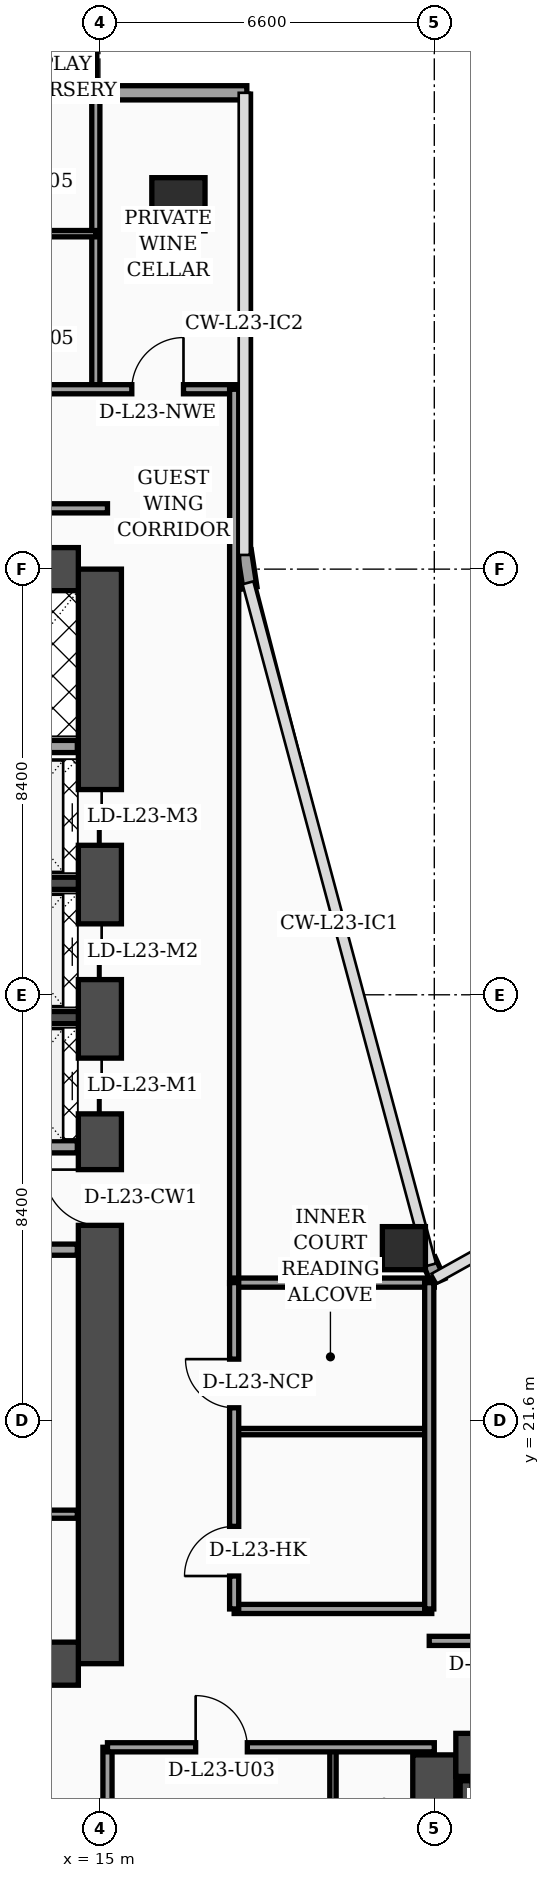
"""IFC4 building model, lengths in metres.
Left out: names, types, materials, properties, quantities, classifications, styles, units other than length and angle.
Written with IfcOpenShell. Run it as: python <this file> out.ifc"""

import sys

from ifc_helpers import new_model, si_unit, direction, frame, frame_2d, origin, origin_2d, place, context, subcontext, project, spatial, rectangle, hollow_rectangle, extrude, element, fill, save


model = new_model("IFC4")
c1 = context("Model", 3, precision=1e-05, world=origin(), true_north=direction((0.0, 1.0)))
c2 = subcontext(c1, "Body", "Model", "MODEL_VIEW")
j1 = project(units=[si_unit("LENGTHUNIT", "METRE"), si_unit("PLANEANGLEUNIT", "RADIAN")], contexts=[c1])
p1 = place(None, origin())
s1 = spatial("IfcSite", under=j1, at=p1, CompositionType="ELEMENT")
p2 = place(p1, origin())
s2 = spatial("IfcBuilding", under=s1, at=p2, CompositionType="ELEMENT")
p3 = place(p2, frame((0.0, 0.0, 97.4)))
s3 = spatial("IfcBuildingStorey", under=s2, at=p3, CompositionType="ELEMENT", Elevation=97.4)
p4 = place(p3, frame((15.0, 16.8, 0.0), z_axis=(0.0, 0.0, 1.0), x_axis=(0.0, 1.0, 0.0)))
e1 = element("IfcWall", 1, at=p4, inside=s3, PredefinedType="SHEAR", context=c2, shape_type="SweptSolid", body=[
    extrude(rectangle(XDim=21.6, YDim=0.85, at=frame_2d((10.8, 0.0))), origin(), (0.0, 0.0, 1.0), 3.56),
])
p5 = place(p4, frame((8.65, 0.0, 0.0)))
e2 = element("IfcOpeningElement", 2, at=p5, cuts=e1, PredefinedType="OPENING", context=c2, shape_type="SweptSolid", body=[
    extrude(rectangle(XDim=1.1, YDim=2.2, at=frame_2d((0.55, 1.1))), frame((0.0, 0.435, 0.0), z_axis=(0.0, -1.0, 0.0), x_axis=(1.0, 0.0, 0.0)), (0.0, 0.0, 1.0), 0.87),
])
p6 = place(p4, frame((10.85, 0.0, 0.0)))
e3 = element("IfcOpeningElement", 3, at=p6, cuts=e1, PredefinedType="OPENING", context=c2, shape_type="SweptSolid", body=[
    extrude(rectangle(XDim=1.1, YDim=2.2, at=frame_2d((0.55, 1.1))), frame((0.0, 0.435, 0.0), z_axis=(0.0, -1.0, 0.0), x_axis=(1.0, 0.0, 0.0)), (0.0, 0.0, 1.0), 0.87),
])
p7 = place(p4, frame((13.5, 0.0, 0.0)))
e4 = element("IfcOpeningElement", 4, at=p7, cuts=e1, PredefinedType="OPENING", context=c2, shape_type="SweptSolid", body=[
    extrude(rectangle(XDim=1.1, YDim=2.2, at=frame_2d((0.55, 1.1))), frame((0.0, 0.435, 0.0), z_axis=(0.0, -1.0, 0.0), x_axis=(1.0, 0.0, 0.0)), (0.0, 0.0, 1.0), 0.87),
])
p8 = place(p4, frame((16.15, 0.0, 0.0)))
e5 = element("IfcOpeningElement", 5, at=p8, cuts=e1, PredefinedType="OPENING", context=c2, shape_type="SweptSolid", body=[
    extrude(rectangle(XDim=1.1, YDim=2.2, at=frame_2d((0.55, 1.1))), frame((0.0, 0.435, 0.0), z_axis=(0.0, -1.0, 0.0), x_axis=(1.0, 0.0, 0.0)), (0.0, 0.0, 1.0), 0.87),
])
for number, where, z_axis, x_axis in (
    (6, (4.625, 38.4, 0.0), (0.0, 0.0, 1.0), (1.0, 0.0, 0.0)),
    (7, (4.625, 16.8, 0.0), (0.0, 0.0, 1.0), (1.0, 0.0, 0.0)),
):
    element("IfcWall", number, at=place(p3, frame(where, z_axis=z_axis, x_axis=x_axis)), inside=s3, PredefinedType="SHEAR", context=c2, shape_type="SweptSolid", body=[
        extrude(rectangle(XDim=9.95, YDim=0.85, at=frame_2d((4.975, 0.0))), origin(), (0.0, 0.0, 1.0), 3.56),
    ])
p9 = place(p3, frame((21.6, 4.6, 0.0), z_axis=(0.0, 0.0, 1.0), x_axis=(0.0, 1.0, 0.0)))
e8 = element("IfcWall", 8, at=p9, inside=s3, PredefinedType="SHEAR", context=c2, shape_type="SweptSolid", body=[
    extrude(rectangle(XDim=10.4, YDim=0.85, at=frame_2d((5.2, 0.0))), origin(), (0.0, 0.0, 1.0), 3.56),
])
p10 = place(p3, frame((22.025, 15.0, 0.0), z_axis=(0.0, 0.0, 1.0), x_axis=(1.0, 0.0, 0.0)))
e9 = element("IfcWall", 9, at=p10, inside=s3, PredefinedType="SHEAR", context=c2, shape_type="SweptSolid", body=[
    extrude(rectangle(XDim=9.95, YDim=0.85, at=frame_2d((4.975, 0.0))), origin(), (0.0, 0.0, 1.0), 3.56),
])
p11 = place(p10, frame((4.88, 0.0, 0.0)))
e10 = element("IfcOpeningElement", 10, at=p11, cuts=e9, PredefinedType="OPENING", context=c2, shape_type="SweptSolid", body=[
    extrude(rectangle(XDim=1.1, YDim=2.2, at=frame_2d((0.55, 1.1))), frame((0.0, 0.435, 0.0), z_axis=(0.0, -1.0, 0.0), x_axis=(1.0, 0.0, 0.0)), (0.0, 0.0, 1.0), 0.87),
])
p12 = place(p3, frame((22.23, 5.025, 0.0), z_axis=(0.0, 0.0, 1.0), x_axis=(0.0, 1.0, 0.0)))
e11 = element("IfcWall", 11, at=p12, inside=s3, PredefinedType="SOLIDWALL", context=c2, shape_type="SweptSolid", body=[
    extrude(rectangle(XDim=9.465, YDim=0.24, at=frame_2d((4.732, 0.0))), origin(), (0.0, 0.0, 1.0), 3.56),
])
for number, where, z_axis, x_axis in (
    (12, (12.18, 29.55, 0.0), (0.0, 0.0, 1.0), (1.0, 0.0, 0.0)),
    (13, (12.18, 32.2, 0.0), (0.0, 0.0, 1.0), (1.0, 0.0, 0.0)),
):
    element("IfcWall", number, at=place(p3, frame(where, z_axis=z_axis, x_axis=x_axis)), inside=s3, PredefinedType="SOLIDWALL", context=c2, shape_type="SweptSolid", body=[
        extrude(rectangle(XDim=2.395, YDim=0.24, at=frame_2d((1.198, 0.0))), origin(), (0.0, 0.0, 1.0), 3.56),
    ])
p13 = place(p3, frame((16.55, 45.6, 0.0), z_axis=(0.0, 0.0, 1.0), x_axis=(1.0, 0.0, 0.0)))
e14 = element("IfcColumn", 14, at=p13, inside=s3, PredefinedType="COLUMN", context=c2, shape_type="SweptSolid", body=[
    extrude(rectangle(XDim=1.05, YDim=1.05, at=origin_2d()), origin(), (0.0, 0.0, 1.0), 3.56),
])
p14 = place(p3, frame((21.0, 25.0, 0.0), z_axis=(0.0, 0.0, 1.0), x_axis=(1.0, 0.0, 0.0)))
e15 = element("IfcColumn", 15, at=p14, inside=s3, PredefinedType="COLUMN", context=c2, shape_type="SweptSolid", body=[
    extrude(hollow_rectangle(XDim=0.85, YDim=0.85, WallThickness=0.036, at=origin_2d()), origin(), (0.0, 0.0, 1.0), 3.56),
])
p15 = place(p3, frame((21.68, 24.34, 0.0), z_axis=(0.0, 0.0, 1.0), x_axis=(-0.40758134973, 0.913168901875, 0.0)))
e16 = element("IfcWall", 16, at=p15, inside=s3, PredefinedType="SOLIDWALL", context=c2, shape_type="SweptSolid", body=[
    extrude(rectangle(XDim=0.471, YDim=0.28, at=frame_2d((0.235, 0.0))), origin(), (0.0, 0.0, 1.0), 3.56),
])
p16 = place(p3, frame((17.962, 38.03, 0.0), z_axis=(0.0, 0.0, 1.0), x_axis=(-0.15141125477, 0.988470855377, 0.0)))
e17 = element("IfcWall", 17, at=p16, inside=s3, PredefinedType="SOLIDWALL", context=c2, shape_type="SweptSolid", body=[
    extrude(rectangle(XDim=0.739, YDim=0.28, at=frame_2d((0.369, 0.0))), origin(), (0.0, 0.0, 1.0), 3.56),
])
p17 = place(p3, frame((17.9, 47.8, 0.0), z_axis=(0.0, 0.0, 1.0), x_axis=(-1.0, 0.0, 0.0)))
e18 = element("IfcWall", 18, at=p17, inside=s3, PredefinedType="SOLIDWALL", context=c2, shape_type="SweptSolid", body=[
    extrude(rectangle(XDim=3.24, YDim=0.28, at=frame_2d((1.62, 0.0))), origin(), (0.0, 0.0, 1.0), 3.56),
])
p18 = place(p3, frame((14.8, 47.94, 0.0), z_axis=(0.0, 0.0, 1.0), x_axis=(0.0, 1.0, 0.0)))
e19 = element("IfcWall", 19, at=p18, inside=s3, PredefinedType="SOLIDWALL", context=c2, shape_type="SweptSolid", body=[
    extrude(rectangle(XDim=2.94, YDim=0.28, at=frame_2d((1.47, 0.0))), origin(), (0.0, 0.0, 1.0), 3.56),
])
p19 = place(p3, frame((9.68, 19.75, 0.0), z_axis=(0.0, 0.0, 1.0), x_axis=(1.0, 0.0, 0.0)))
e20 = element("IfcWall", 20, at=p19, inside=s3, PredefinedType="PARTITIONING", context=c2, shape_type="SweptSolid", body=[
    extrude(rectangle(XDim=4.875, YDim=0.16, at=frame_2d((2.438, 0.0))), origin(), (0.0, 0.0, 1.0), 3.56),
])
p20 = place(p19, frame((1.1, 0.0, 0.0)))
e21 = element("IfcOpeningElement", 21, at=p20, cuts=e20, PredefinedType="OPENING", context=c2, shape_type="SweptSolid", body=[
    extrude(rectangle(XDim=0.98, YDim=2.15, at=frame_2d((0.49, 1.075))), frame((0.0, 0.09, 0.0), z_axis=(0.0, -1.0, 0.0), x_axis=(1.0, 0.0, 0.0)), (0.0, 0.0, 1.0), 0.18),
])
p21 = place(p3, frame((9.68, 24.97, 0.0), z_axis=(0.0, 0.0, 1.0), x_axis=(1.0, 0.0, 0.0)))
e22 = element("IfcWall", 22, at=p21, inside=s3, PredefinedType="SOLIDWALL", context=c2, shape_type="SweptSolid", body=[
    extrude(rectangle(XDim=4.875, YDim=0.22, at=frame_2d((2.438, 0.0))), origin(), (0.0, 0.0, 1.0), 2.84),
])
p22 = place(p21, frame((0.9, 0.0, 0.0)))
e23 = element("IfcOpeningElement", 23, at=p22, cuts=e22, PredefinedType="OPENING", context=c2, shape_type="SweptSolid", body=[
    extrude(rectangle(XDim=0.98, YDim=2.15, at=frame_2d((0.49, 1.075))), frame((0.0, 0.12, 0.0), z_axis=(0.0, -1.0, 0.0), x_axis=(1.0, 0.0, 0.0)), (0.0, 0.0, 1.0), 0.24),
])
p23 = place(p3, frame((12.25, 27.0, 0.0), z_axis=(0.0, 0.0, 1.0), x_axis=(1.0, 0.0, 0.0)))
e24 = element("IfcWall", 24, at=p23, inside=s3, PredefinedType="SOLIDWALL", context=c2, shape_type="SweptSolid", body=[
    extrude(rectangle(XDim=2.305, YDim=0.24, at=frame_2d((1.152, 0.0))), origin(), (0.0, 0.0, 1.0), 3.56),
])
p24 = place(p3, frame((9.66, 34.9, 0.0), z_axis=(0.0, 0.0, 1.0), x_axis=(1.0, 0.0, 0.0)))
e25 = element("IfcWall", 25, at=p24, inside=s3, PredefinedType="SOLIDWALL", context=c2, shape_type="SweptSolid", body=[
    extrude(rectangle(XDim=4.895, YDim=0.24, at=frame_2d((2.448, 0.0))), origin(), (0.0, 0.0, 1.0), 3.56),
])
p25 = place(p3, frame((15.15, 2.44, 0.0), z_axis=(0.0, 0.0, 1.0), x_axis=(0.0, 1.0, 0.0)))
e26 = element("IfcWall", 26, at=p25, inside=s3, PredefinedType="PARTITIONING", context=c2, shape_type="SweptSolid", body=[
    extrude(rectangle(XDim=12.71, YDim=0.18, at=frame_2d((6.355, 0.0))), origin(), (0.0, 0.0, 1.0), 3.04),
])
p26 = place(p3, frame((19.6, 2.44, 0.0), z_axis=(0.0, 0.0, 1.0), x_axis=(0.0, 1.0, 0.0)))
e27 = element("IfcWall", 27, at=p26, inside=s3, PredefinedType="PARTITIONING", context=c2, shape_type="SweptSolid", body=[
    extrude(rectangle(XDim=12.71, YDim=0.125, at=frame_2d((6.355, 0.0))), origin(), (0.0, 0.0, 1.0), 2.49),
])
p27 = place(p26, frame((4.34, 0.0, 0.0)))
e28 = element("IfcOpeningElement", 28, at=p27, cuts=e27, PredefinedType="OPENING", context=c2, shape_type="SweptSolid", body=[
    extrude(rectangle(XDim=0.96, YDim=2.2, at=frame_2d((0.48, 1.1))), frame((0.0, 0.073, 0.0), z_axis=(0.0, -1.0, 0.0), x_axis=(1.0, 0.0, 0.0)), (0.0, 0.0, 1.0), 0.145),
])
p28 = place(p26, frame((10.18, 0.0, 0.0)))
e29 = element("IfcOpeningElement", 29, at=p28, cuts=e27, PredefinedType="OPENING", context=c2, shape_type="SweptSolid", body=[
    extrude(rectangle(XDim=0.9, YDim=2.15, at=frame_2d((0.45, 1.075))), frame((0.0, 0.073, 0.0), z_axis=(0.0, -1.0, 0.0), x_axis=(1.0, 0.0, 0.0)), (0.0, 0.0, 1.0), 0.145),
])
p29 = place(p3, frame((15.15, 15.15, 0.0), z_axis=(0.0, 0.0, 1.0), x_axis=(1.0, 0.0, 0.0)))
e30 = element("IfcWall", 30, at=p29, inside=s3, PredefinedType="PARTITIONING", context=c2, shape_type="SweptSolid", body=[
    extrude(rectangle(XDim=6.45, YDim=0.18, at=frame_2d((3.225, 0.0))), origin(), (0.0, 0.0, 1.0), 2.49),
])
p30 = place(p29, frame((1.74, 0.0, 0.0)))
e31 = element("IfcOpeningElement", 31, at=p30, cuts=e30, PredefinedType="OPENING", context=c2, shape_type="SweptSolid", body=[
    extrude(rectangle(XDim=1.02, YDim=2.2, at=frame_2d((0.51, 1.1))), frame((0.0, 0.1, 0.0), z_axis=(0.0, -1.0, 0.0), x_axis=(1.0, 0.0, 0.0)), (0.0, 0.0, 1.0), 0.2),
])
p31 = place(p3, frame((14.92, 41.95, 0.0), z_axis=(0.0, 0.0, 1.0), x_axis=(0.0, 1.0, 0.0)))
e32 = element("IfcWall", 32, at=p31, inside=s3, PredefinedType="PARTITIONING", context=c2, shape_type="SweptSolid", body=[
    extrude(rectangle(XDim=5.85, YDim=0.16, at=frame_2d((2.925, 0.0))), origin(), (0.0, 0.0, 1.0), 3.04),
])
p32 = place(p3, frame((12.99, 45.02, 0.0), z_axis=(0.0, 0.0, 1.0), x_axis=(1.0, 0.0, 0.0)))
e33 = element("IfcWall", 33, at=p32, inside=s3, PredefinedType="PARTITIONING", context=c2, shape_type="SweptSolid", body=[
    extrude(rectangle(XDim=1.93, YDim=0.125, at=frame_2d((0.965, 0.0))), origin(), (0.0, 0.0, 1.0), 3.56),
])
p33 = place(p3, frame((0.08, 41.95, 0.0), z_axis=(0.0, 0.0, 1.0), x_axis=(1.0, 0.0, 0.0)))
e34 = element("IfcWall", 34, at=p33, inside=s3, PredefinedType="PARTITIONING", context=c2, shape_type="SweptSolid", body=[
    extrude(rectangle(XDim=17.77, YDim=0.18, at=frame_2d((8.885, 0.0))), origin(), (0.0, 0.0, 1.0), 2.84),
])
p34 = place(p33, frame((0.9, 0.0, 0.0)))
e35 = element("IfcOpeningElement", 35, at=p34, cuts=e34, PredefinedType="OPENING", context=c2, shape_type="SweptSolid", body=[
    extrude(rectangle(XDim=1.02, YDim=2.2, at=frame_2d((0.51, 1.1))), frame((0.0, 0.1, 0.0), z_axis=(0.0, -1.0, 0.0), x_axis=(1.0, 0.0, 0.0)), (0.0, 0.0, 1.0), 0.2),
])
p35 = place(p33, frame((4.45, 0.0, 0.0)))
e36 = element("IfcOpeningElement", 36, at=p35, cuts=e34, PredefinedType="OPENING", context=c2, shape_type="SweptSolid", body=[
    extrude(rectangle(XDim=1.02, YDim=2.2, at=frame_2d((0.51, 1.1))), frame((0.0, 0.1, 0.0), z_axis=(0.0, -1.0, 0.0), x_axis=(1.0, 0.0, 0.0)), (0.0, 0.0, 1.0), 0.2),
])
p36 = place(p33, frame((10.33, 0.0, 0.0)))
e37 = element("IfcOpeningElement", 37, at=p36, cuts=e34, PredefinedType="OPENING", context=c2, shape_type="SweptSolid", body=[
    extrude(rectangle(XDim=1.02, YDim=2.2, at=frame_2d((0.51, 1.1))), frame((0.0, 0.1, 0.0), z_axis=(0.0, -1.0, 0.0), x_axis=(1.0, 0.0, 0.0)), (0.0, 0.0, 1.0), 0.2),
])
p37 = place(p33, frame((15.55, 0.0, 0.0)))
e38 = element("IfcOpeningElement", 38, at=p37, cuts=e34, PredefinedType="OPENING", context=c2, shape_type="SweptSolid", body=[
    extrude(rectangle(XDim=1.02, YDim=2.2, at=frame_2d((0.51, 1.1))), frame((0.0, 0.1, 0.0), z_axis=(0.0, -1.0, 0.0), x_axis=(1.0, 0.0, 0.0)), (0.0, 0.0, 1.0), 0.2),
])
p38 = place(p3, frame((17.65, 24.3, 0.0), z_axis=(0.0, 0.0, 1.0), x_axis=(0.0, 1.0, 0.0)))
e39 = element("IfcWall", 39, at=p38, inside=s3, PredefinedType="PARTITIONING", context=c2, shape_type="SweptSolid", body=[
    extrude(rectangle(XDim=17.65, YDim=0.18, at=frame_2d((8.825, 0.0))), origin(), (0.0, 0.0, 1.0), 2.84),
])
p39 = place(p3, frame((3.755, 39.6, 0.0), z_axis=(0.0, 0.0, 1.0), x_axis=(1.0, 0.0, 0.0)))
e40 = element("IfcWall", 40, at=p39, inside=s3, PredefinedType="PARTITIONING", context=c2, shape_type="SweptSolid", body=[
    extrude(rectangle(XDim=11.395, YDim=0.18, at=frame_2d((5.698, 0.0))), origin(), (0.0, 0.0, 1.0), 2.84),
])
p40 = place(p3, frame((17.65, 17.88, 0.0), z_axis=(0.0, 0.0, 1.0), x_axis=(1.0, 0.0, 0.0)))
e41 = element("IfcWall", 41, at=p40, inside=s3, PredefinedType="PARTITIONING", context=c2, shape_type="SweptSolid", body=[
    extrude(rectangle(XDim=3.9, YDim=0.18, at=frame_2d((1.95, 0.0))), origin(), (0.0, 0.0, 1.0), 3.56),
])
p41 = place(p3, frame((17.65, 21.38, 0.0), z_axis=(0.0, 0.0, 1.0), x_axis=(1.0, 0.0, 0.0)))
e42 = element("IfcWall", 42, at=p41, inside=s3, PredefinedType="PARTITIONING", context=c2, shape_type="SweptSolid", body=[
    extrude(rectangle(XDim=3.9, YDim=0.125, at=frame_2d((1.95, 0.0))), origin(), (0.0, 0.0, 1.0), 3.56),
])
p42 = place(p3, frame((17.65, 24.32, 0.0), z_axis=(0.0, 0.0, 1.0), x_axis=(1.0, 0.0, 0.0)))
e43 = element("IfcWall", 43, at=p42, inside=s3, PredefinedType="PARTITIONING", context=c2, shape_type="SweptSolid", body=[
    extrude(rectangle(XDim=3.95, YDim=0.18, at=frame_2d((1.975, 0.0))), origin(), (0.0, 0.0, 1.0), 3.56),
])
p43 = place(p3, frame((21.5, 17.88, 0.0), z_axis=(0.0, 0.0, 1.0), x_axis=(0.0, 1.0, 0.0)))
e44 = element("IfcWall", 44, at=p43, inside=s3, PredefinedType="PARTITIONING", context=c2, shape_type="SweptSolid", body=[
    extrude(rectangle(XDim=6.44, YDim=0.18, at=frame_2d((3.22, 0.0))), origin(), (0.0, 0.0, 1.0), 3.56),
])
p44 = place(p3, frame((17.65, 17.88, 0.0), z_axis=(0.0, 0.0, 1.0), x_axis=(0.0, 1.0, 0.0)))
e45 = element("IfcWall", 45, at=p44, inside=s3, PredefinedType="PARTITIONING", context=c2, shape_type="SweptSolid", body=[
    extrude(rectangle(XDim=6.44, YDim=0.18, at=frame_2d((3.22, 0.0))), origin(), (0.0, 0.0, 1.0), 3.56),
])
p45 = place(p44, frame((0.65, 0.0, 0.0)))
e46 = element("IfcOpeningElement", 46, at=p45, cuts=e45, PredefinedType="OPENING", context=c2, shape_type="SweptSolid", body=[
    extrude(rectangle(XDim=0.98, YDim=2.15, at=frame_2d((0.49, 1.075))), frame((0.0, 0.1, 0.0), z_axis=(0.0, -1.0, 0.0), x_axis=(1.0, 0.0, 0.0)), (0.0, 0.0, 1.0), 0.2),
])
p46 = place(p44, frame((3.97, 0.0, 0.0)))
e47 = element("IfcOpeningElement", 47, at=p46, cuts=e45, PredefinedType="OPENING", context=c2, shape_type="SweptSolid", body=[
    extrude(rectangle(XDim=0.96, YDim=2.2, at=frame_2d((0.48, 1.1))), frame((0.0, 0.1, 0.0), z_axis=(0.0, -1.0, 0.0), x_axis=(1.0, 0.0, 0.0)), (0.0, 0.0, 1.0), 0.2),
])
p47 = place(p3, frame((21.5, 17.25, 0.0), z_axis=(0.0, 0.0, 1.0), x_axis=(1.0, 0.0, 0.0)))
e48 = element("IfcWall", 48, at=p47, inside=s3, PredefinedType="PARTITIONING", context=c2, shape_type="SweptSolid", body=[
    extrude(rectangle(XDim=24.25, YDim=0.18, at=frame_2d((12.125, 0.0))), origin(), (0.0, 0.0, 1.0), 2.84),
])
p48 = place(p47, frame((0.95, 0.0, 0.0)))
e49 = element("IfcOpeningElement", 49, at=p48, cuts=e48, PredefinedType="OPENING", context=c2, shape_type="SweptSolid", body=[
    extrude(rectangle(XDim=1.02, YDim=2.2, at=frame_2d((0.51, 1.1))), frame((0.0, 0.1, 0.0), z_axis=(0.0, -1.0, 0.0), x_axis=(1.0, 0.0, 0.0)), (0.0, 0.0, 1.0), 0.2),
])
p49 = place(p47, frame((9.65, 0.0, 0.0)))
e50 = element("IfcOpeningElement", 50, at=p49, cuts=e48, PredefinedType="OPENING", context=c2, shape_type="SweptSolid", body=[
    extrude(rectangle(XDim=1.02, YDim=2.2, at=frame_2d((0.51, 1.1))), frame((0.0, 0.1, 0.0), z_axis=(0.0, -1.0, 0.0), x_axis=(1.0, 0.0, 0.0)), (0.0, 0.0, 1.0), 0.2),
])
p50 = place(p47, frame((17.05, 0.0, 0.0)))
e51 = element("IfcOpeningElement", 51, at=p50, cuts=e48, PredefinedType="OPENING", context=c2, shape_type="SweptSolid", body=[
    extrude(rectangle(XDim=1.02, YDim=2.2, at=frame_2d((0.51, 1.1))), frame((0.0, 0.1, 0.0), z_axis=(0.0, -1.0, 0.0), x_axis=(1.0, 0.0, 0.0)), (0.0, 0.0, 1.0), 0.2),
])
p51 = place(p30, origin())
e52 = element("IfcDoor", 52, at=p51, inside=s3, OperationType="SINGLE_SWING_LEFT", PredefinedType="DOOR", context=c2, shape_type="SweptSolid", body=[
    extrude(rectangle(XDim=1.02, YDim=2.2, at=frame_2d((0.51, 1.1))), frame((0.0, 0.025, 0.0), z_axis=(0.0, -1.0, 0.0), x_axis=(1.0, 0.0, 0.0)), (0.0, 0.0, 1.0), 0.05),
])
fill(e31, e52)
p52 = place(p37, origin())
e53 = element("IfcDoor", 53, at=p52, inside=s3, OperationType="SINGLE_SWING_RIGHT", PredefinedType="DOOR", context=c2, shape_type="SweptSolid", body=[
    extrude(rectangle(XDim=1.02, YDim=2.2, at=frame_2d((0.51, 1.1))), frame((0.0, 0.025, 0.0), z_axis=(0.0, -1.0, 0.0), x_axis=(1.0, 0.0, 0.0)), (0.0, 0.0, 1.0), 0.05),
])
fill(e38, e53)
p53 = place(p45, origin())
e54 = element("IfcDoor", 54, at=p53, inside=s3, OperationType="SINGLE_SWING_LEFT", PredefinedType="DOOR", context=c2, shape_type="SweptSolid", body=[
    extrude(rectangle(XDim=0.98, YDim=2.15, at=frame_2d((0.49, 1.075))), frame((0.0, 0.025, 0.0), z_axis=(0.0, -1.0, 0.0), x_axis=(1.0, 0.0, 0.0)), (0.0, 0.0, 1.0), 0.05),
])
fill(e46, e54)
p54 = place(p46, origin())
e55 = element("IfcDoor", 55, at=p54, inside=s3, OperationType="SINGLE_SWING_RIGHT", PredefinedType="DOOR", context=c2, shape_type="SweptSolid", body=[
    extrude(rectangle(XDim=0.96, YDim=2.2, at=frame_2d((0.48, 1.1))), frame((0.0, 0.025, 0.0), z_axis=(0.0, -1.0, 0.0), x_axis=(1.0, 0.0, 0.0)), (0.0, 0.0, 1.0), 0.05),
])
fill(e47, e55)
p55 = place(p5, origin())
e56 = element("IfcDoor", 56, at=p55, inside=s3, OperationType="SINGLE_SWING_RIGHT", PredefinedType="DOOR", context=c2, shape_type="SweptSolid", body=[
    extrude(rectangle(XDim=1.1, YDim=2.2, at=frame_2d((0.55, 1.1))), frame((0.0, 0.025, 0.0), z_axis=(0.0, -1.0, 0.0), x_axis=(1.0, 0.0, 0.0)), (0.0, 0.0, 1.0), 0.05),
])
fill(e2, e56)
p56 = place(p6, origin())
e57 = element("IfcDoor", 57, at=p56, inside=s3, OperationType="DOUBLE_DOOR_SLIDING", PredefinedType="DOOR", context=c2, shape_type="SweptSolid", body=[
    extrude(rectangle(XDim=1.1, YDim=2.2, at=frame_2d((0.55, 1.1))), frame((0.0, 0.025, 0.0), z_axis=(0.0, -1.0, 0.0), x_axis=(1.0, 0.0, 0.0)), (0.0, 0.0, 1.0), 0.05),
])
fill(e3, e57)
p57 = place(p7, origin())
e58 = element("IfcDoor", 58, at=p57, inside=s3, OperationType="DOUBLE_DOOR_SLIDING", PredefinedType="DOOR", context=c2, shape_type="SweptSolid", body=[
    extrude(rectangle(XDim=1.1, YDim=2.2, at=frame_2d((0.55, 1.1))), frame((0.0, 0.025, 0.0), z_axis=(0.0, -1.0, 0.0), x_axis=(1.0, 0.0, 0.0)), (0.0, 0.0, 1.0), 0.05),
])
fill(e4, e58)
p58 = place(p8, origin())
e59 = element("IfcDoor", 59, at=p58, inside=s3, OperationType="DOUBLE_DOOR_SLIDING", PredefinedType="DOOR", context=c2, shape_type="SweptSolid", body=[
    extrude(rectangle(XDim=1.1, YDim=2.2, at=frame_2d((0.55, 1.1))), frame((0.0, 0.025, 0.0), z_axis=(0.0, -1.0, 0.0), x_axis=(1.0, 0.0, 0.0)), (0.0, 0.0, 1.0), 0.05),
])
fill(e5, e59)
save(model, sys.argv[1])
